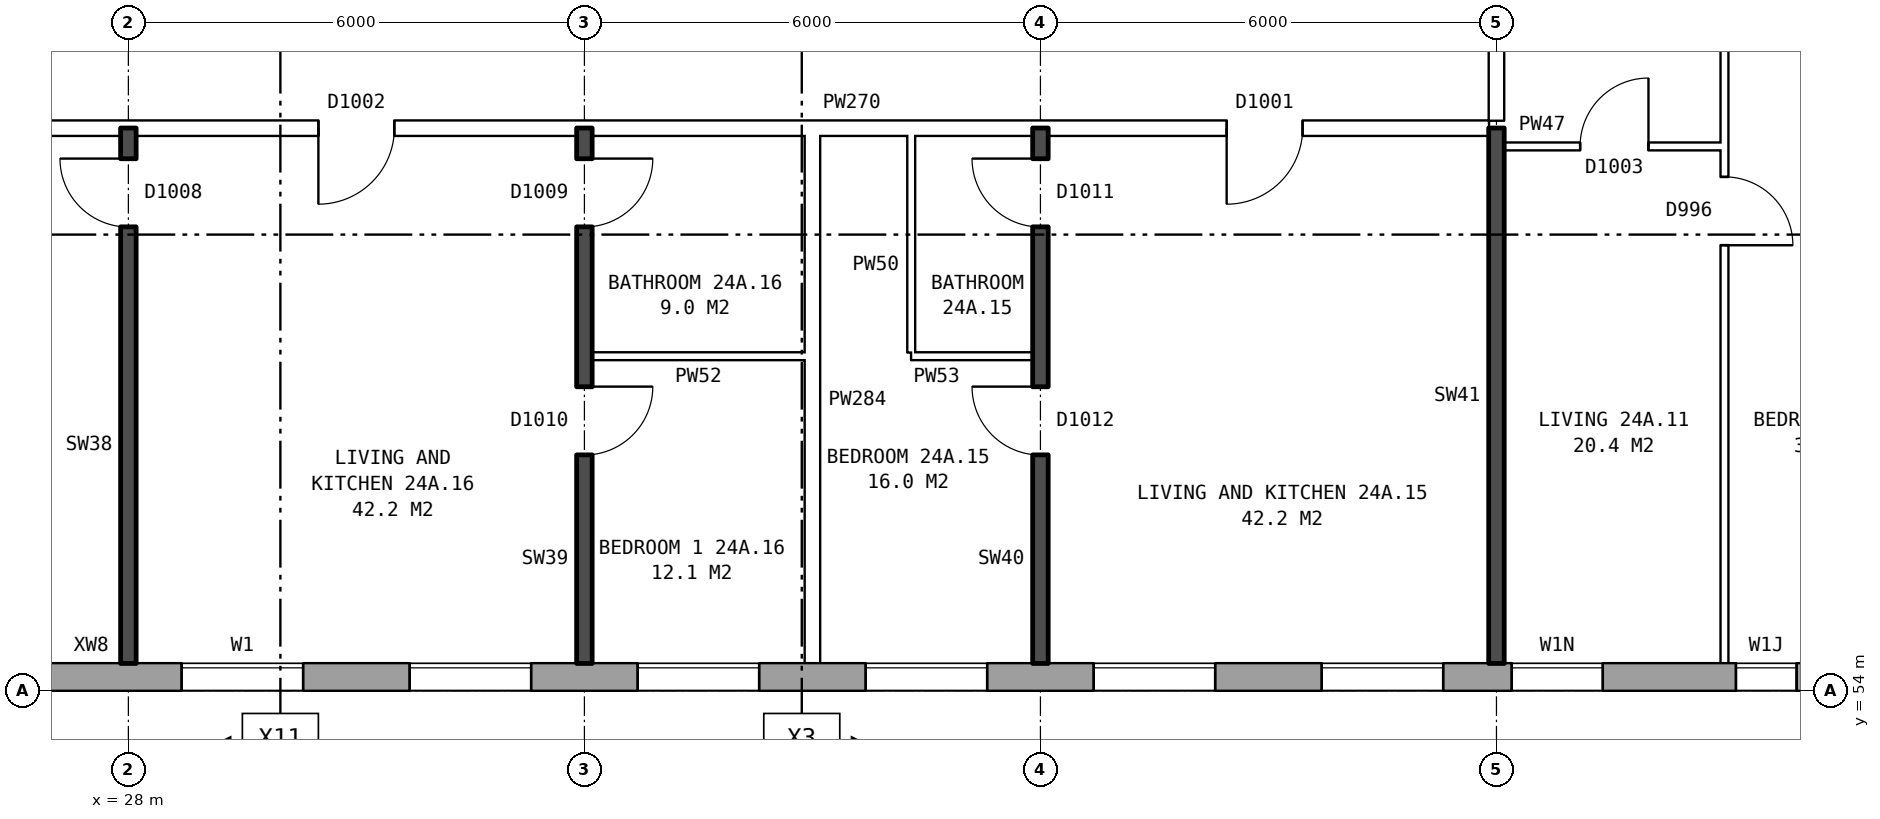
"""IFC4 building model, lengths in metres.
Left out: names, types, materials, properties, quantities, classifications, styles, units other than length and angle.
Written with IfcOpenShell. Run it as: python <this file> out.ifc"""

import sys

from ifc_helpers import new_model, si_unit, direction, frame, frame_2d, origin, place, context, subcontext, project, spatial, rectangle, extrude, element, fill, save


model = new_model("IFC4")
c1 = context("Model", 3, precision=1e-05, world=origin(), true_north=direction((0.0, 1.0)))
c2 = subcontext(c1, "Body", "Model", "MODEL_VIEW")
j1 = project(units=[si_unit("LENGTHUNIT", "METRE"), si_unit("PLANEANGLEUNIT", "RADIAN")], contexts=[c1])
p1 = place(None, origin())
s1 = spatial("IfcSite", under=j1, at=p1, CompositionType="ELEMENT")
p2 = place(p1, origin())
s2 = spatial("IfcBuilding", under=s1, at=p2, CompositionType="ELEMENT")
p3 = place(p2, frame((0.0, 0.0, 87.1)))
s3 = spatial("IfcBuildingStorey", under=s2, at=p3, CompositionType="ELEMENT", Elevation=87.1)
p4 = place(p3, frame((26.325, 54.18, 0.0), z_axis=(0.0, 0.0, 1.0), x_axis=(1.0, 0.0, 0.0)))
e1 = element("IfcWall", 1, at=p4, inside=s3, PredefinedType="STANDARD", context=c2, shape_type="SweptSolid", body=[
    extrude(rectangle(XDim=46.601, YDim=0.36, at=frame_2d((23.3, 0.0))), origin(), (0.0, 0.0, 1.0), 2.85),
])
p5 = place(p4, frame((2.375, 0.0, 0.8)))
e2 = element("IfcOpeningElement", 2, at=p5, cuts=e1, PredefinedType="OPENING", context=c2, shape_type="SweptSolid", body=[
    extrude(rectangle(XDim=1.6, YDim=1.8, at=frame_2d((0.8, 0.9))), frame((0.0, 0.19, 0.0), z_axis=(0.0, -1.0, 0.0), x_axis=(1.0, 0.0, 0.0)), (0.0, 0.0, 1.0), 0.38),
])
p6 = place(p4, frame((5.375, 0.0, 0.8)))
e3 = element("IfcOpeningElement", 3, at=p6, cuts=e1, PredefinedType="OPENING", context=c2, shape_type="SweptSolid", body=[
    extrude(rectangle(XDim=1.6, YDim=1.8, at=frame_2d((0.8, 0.9))), frame((0.0, 0.19, 0.0), z_axis=(0.0, -1.0, 0.0), x_axis=(1.0, 0.0, 0.0)), (0.0, 0.0, 1.0), 0.38),
])
p7 = place(p4, frame((8.375, 0.0, 0.8)))
e4 = element("IfcOpeningElement", 4, at=p7, cuts=e1, PredefinedType="OPENING", context=c2, shape_type="SweptSolid", body=[
    extrude(rectangle(XDim=1.6, YDim=1.8, at=frame_2d((0.8, 0.9))), frame((0.0, 0.19, 0.0), z_axis=(0.0, -1.0, 0.0), x_axis=(1.0, 0.0, 0.0)), (0.0, 0.0, 1.0), 0.38),
])
p8 = place(p4, frame((11.375, 0.0, 0.8)))
e5 = element("IfcOpeningElement", 5, at=p8, cuts=e1, PredefinedType="OPENING", context=c2, shape_type="SweptSolid", body=[
    extrude(rectangle(XDim=1.6, YDim=1.8, at=frame_2d((0.8, 0.9))), frame((0.0, 0.19, 0.0), z_axis=(0.0, -1.0, 0.0), x_axis=(1.0, 0.0, 0.0)), (0.0, 0.0, 1.0), 0.38),
])
p9 = place(p4, frame((14.375, 0.0, 0.8)))
e6 = element("IfcOpeningElement", 6, at=p9, cuts=e1, PredefinedType="OPENING", context=c2, shape_type="SweptSolid", body=[
    extrude(rectangle(XDim=1.6, YDim=1.8, at=frame_2d((0.8, 0.9))), frame((0.0, 0.19, 0.0), z_axis=(0.0, -1.0, 0.0), x_axis=(1.0, 0.0, 0.0)), (0.0, 0.0, 1.0), 0.38),
])
p10 = place(p4, frame((17.375, 0.0, 0.8)))
e7 = element("IfcOpeningElement", 7, at=p10, cuts=e1, PredefinedType="OPENING", context=c2, shape_type="SweptSolid", body=[
    extrude(rectangle(XDim=1.6, YDim=1.8, at=frame_2d((0.8, 0.9))), frame((0.0, 0.19, 0.0), z_axis=(0.0, -1.0, 0.0), x_axis=(1.0, 0.0, 0.0)), (0.0, 0.0, 1.0), 0.38),
])
p11 = place(p4, frame((19.875, 0.0, 1.4)))
e8 = element("IfcOpeningElement", 8, at=p11, cuts=e1, PredefinedType="OPENING", context=c2, shape_type="SweptSolid", body=[
    extrude(rectangle(XDim=1.2, YDim=1.2, at=frame_2d((0.6, 0.6))), frame((0.0, 0.19, 0.0), z_axis=(0.0, -1.0, 0.0), x_axis=(1.0, 0.0, 0.0)), (0.0, 0.0, 1.0), 0.38),
])
p12 = place(p4, frame((22.825, 0.0, 0.25)))
e9 = element("IfcOpeningElement", 9, at=p12, cuts=e1, PredefinedType="OPENING", context=c2, shape_type="SweptSolid", body=[
    extrude(rectangle(XDim=0.8, YDim=1.5, at=frame_2d((0.4, 0.75))), frame((0.0, 0.19, 0.0), z_axis=(0.0, -1.0, 0.0), x_axis=(1.0, 0.0, 0.0)), (0.0, 0.0, 1.0), 0.38),
])
p13 = place(p4, frame((26.375, 0.0, 0.8)))
e10 = element("IfcOpeningElement", 10, at=p13, cuts=e1, PredefinedType="OPENING", context=c2, shape_type="SweptSolid", body=[
    extrude(rectangle(XDim=1.6, YDim=1.8, at=frame_2d((0.8, 0.9))), frame((0.0, 0.19, 0.0), z_axis=(0.0, -1.0, 0.0), x_axis=(1.0, 0.0, 0.0)), (0.0, 0.0, 1.0), 0.38),
])
p14 = place(p4, frame((29.375, 0.0, 0.8)))
e11 = element("IfcOpeningElement", 11, at=p14, cuts=e1, PredefinedType="OPENING", context=c2, shape_type="SweptSolid", body=[
    extrude(rectangle(XDim=1.6, YDim=1.8, at=frame_2d((0.8, 0.9))), frame((0.0, 0.19, 0.0), z_axis=(0.0, -1.0, 0.0), x_axis=(1.0, 0.0, 0.0)), (0.0, 0.0, 1.0), 0.38),
])
p15 = place(p4, frame((32.375, 0.0, 0.8)))
e12 = element("IfcOpeningElement", 12, at=p15, cuts=e1, PredefinedType="OPENING", context=c2, shape_type="SweptSolid", body=[
    extrude(rectangle(XDim=1.6, YDim=1.8, at=frame_2d((0.8, 0.9))), frame((0.0, 0.19, 0.0), z_axis=(0.0, -1.0, 0.0), x_axis=(1.0, 0.0, 0.0)), (0.0, 0.0, 1.0), 0.38),
])
p16 = place(p4, frame((35.375, 0.0, 0.8)))
e13 = element("IfcOpeningElement", 13, at=p16, cuts=e1, PredefinedType="OPENING", context=c2, shape_type="SweptSolid", body=[
    extrude(rectangle(XDim=1.6, YDim=1.8, at=frame_2d((0.8, 0.9))), frame((0.0, 0.19, 0.0), z_axis=(0.0, -1.0, 0.0), x_axis=(1.0, 0.0, 0.0)), (0.0, 0.0, 1.0), 0.38),
])
p17 = place(p4, frame((38.375, 0.0, 0.8)))
e14 = element("IfcOpeningElement", 14, at=p17, cuts=e1, PredefinedType="OPENING", context=c2, shape_type="SweptSolid", body=[
    extrude(rectangle(XDim=1.6, YDim=1.8, at=frame_2d((0.8, 0.9))), frame((0.0, 0.19, 0.0), z_axis=(0.0, -1.0, 0.0), x_axis=(1.0, 0.0, 0.0)), (0.0, 0.0, 1.0), 0.38),
])
p18 = place(p4, frame((41.375, 0.0, 0.8)))
e15 = element("IfcOpeningElement", 15, at=p18, cuts=e1, PredefinedType="OPENING", context=c2, shape_type="SweptSolid", body=[
    extrude(rectangle(XDim=1.6, YDim=1.8, at=frame_2d((0.8, 0.9))), frame((0.0, 0.19, 0.0), z_axis=(0.0, -1.0, 0.0), x_axis=(1.0, 0.0, 0.0)), (0.0, 0.0, 1.0), 0.38),
])
p19 = place(p4, frame((44.375, 0.0, 0.8)))
e16 = element("IfcOpeningElement", 16, at=p19, cuts=e1, PredefinedType="OPENING", context=c2, shape_type="SweptSolid", body=[
    extrude(rectangle(XDim=1.6, YDim=1.8, at=frame_2d((0.8, 0.9))), frame((0.0, 0.19, 0.0), z_axis=(0.0, -1.0, 0.0), x_axis=(1.0, 0.0, 0.0)), (0.0, 0.0, 1.0), 0.38),
])
p20 = place(p4, frame((23.925, 0.0, 0.15)))
e17 = element("IfcOpeningElement", 17, at=p20, cuts=e1, PredefinedType="OPENING", context=c2, shape_type="SweptSolid", body=[
    extrude(rectangle(XDim=0.6, YDim=0.9, at=frame_2d((0.3, 0.45))), frame((0.0, 0.19, 0.0), z_axis=(0.0, -1.0, 0.0), x_axis=(1.0, 0.0, 0.0)), (0.0, 0.0, 1.0), 0.38),
])
p21 = place(p3, frame((34.1, 58.4, 0.0), z_axis=(0.0, 0.0, 1.0), x_axis=(1.0, 0.0, 0.0)))
e18 = element("IfcWall", 18, at=p21, inside=s3, PredefinedType="PARTITIONING", context=c2, shape_type="SweptSolid", body=[
    extrude(rectangle(XDim=2.8, YDim=0.1, at=frame_2d((1.4, 0.0))), origin(), (0.0, 0.0, 1.0), 2.85),
])
p22 = place(p3, frame((38.3, 58.4, 0.0), z_axis=(0.0, 0.0, 1.0), x_axis=(1.0, 0.0, 0.0)))
e19 = element("IfcWall", 19, at=p22, inside=s3, PredefinedType="PARTITIONING", context=c2, shape_type="SweptSolid", body=[
    extrude(rectangle(XDim=1.6, YDim=0.1, at=frame_2d((0.8, 0.0))), origin(), (0.0, 0.0, 1.0), 2.85),
])
p23 = place(p3, frame((46.1, 61.16, 0.0), z_axis=(0.0, 0.0, 1.0), x_axis=(1.0, 0.0, 0.0)))
e20 = element("IfcWall", 20, at=p23, inside=s3, PredefinedType="PARTITIONING", context=c2, shape_type="SweptSolid", body=[
    extrude(rectangle(XDim=2.9, YDim=0.1, at=frame_2d((1.45, 0.0))), origin(), (0.0, 0.0, 1.0), 2.85),
])
p24 = place(p23, frame((1.0, 0.0, 0.0)))
e21 = element("IfcOpeningElement", 21, at=p24, cuts=e20, PredefinedType="OPENING", context=c2, shape_type="SweptSolid", body=[
    extrude(rectangle(XDim=0.9, YDim=2.1, at=frame_2d((0.45, 1.05))), frame((0.0, 0.06, 0.0), z_axis=(0.0, -1.0, 0.0), x_axis=(1.0, 0.0, 0.0)), (0.0, 0.0, 1.0), 0.12),
])
p25 = place(p3, frame((23.61, 61.4, 0.0), z_axis=(0.0, 0.0, 1.0), x_axis=(1.0, 0.0, 0.0)))
e22 = element("IfcWall", 22, at=p25, inside=s3, PredefinedType="PARTITIONING", context=c2, shape_type="SweptSolid", body=[
    extrude(rectangle(XDim=22.29, YDim=0.2, at=frame_2d((11.145, 0.0))), origin(), (0.0, 0.0, 1.0), 2.85),
])
p26 = place(p25, frame((18.84, 0.0, 0.0)))
e23 = element("IfcOpeningElement", 23, at=p26, cuts=e22, PredefinedType="OPENING", context=c2, shape_type="SweptSolid", body=[
    extrude(rectangle(XDim=1.0, YDim=2.1, at=frame_2d((0.5, 1.05))), frame((0.0, 0.11, 0.0), z_axis=(0.0, -1.0, 0.0), x_axis=(1.0, 0.0, 0.0)), (0.0, 0.0, 1.0), 0.22),
])
p27 = place(p25, frame((6.89, 0.0, 0.0)))
e24 = element("IfcOpeningElement", 24, at=p27, cuts=e22, PredefinedType="OPENING", context=c2, shape_type="SweptSolid", body=[
    extrude(rectangle(XDim=1.0, YDim=2.1, at=frame_2d((0.5, 1.05))), frame((0.0, 0.11, 0.0), z_axis=(0.0, -1.0, 0.0), x_axis=(1.0, 0.0, 0.0)), (0.0, 0.0, 1.0), 0.22),
])
p28 = place(p3, frame((28.0, 54.36, 0.0), z_axis=(0.0, 0.0, 1.0), x_axis=(0.0, 1.0, 0.0)))
e25 = element("IfcWall", 25, at=p28, inside=s3, PredefinedType="SOLIDWALL", context=c2, shape_type="SweptSolid", body=[
    extrude(rectangle(XDim=7.04, YDim=0.2, at=frame_2d((3.52, 0.0))), origin(), (0.0, 0.0, 1.0), 2.85),
])
p29 = place(p28, frame((5.74, 0.0, 0.0)))
e26 = element("IfcOpeningElement", 26, at=p29, cuts=e25, PredefinedType="OPENING", context=c2, shape_type="SweptSolid", body=[
    extrude(rectangle(XDim=0.9, YDim=2.1, at=frame_2d((0.45, 1.05))), frame((0.0, 0.11, 0.0), z_axis=(0.0, -1.0, 0.0), x_axis=(1.0, 0.0, 0.0)), (0.0, 0.0, 1.0), 0.22),
])
p30 = place(p3, frame((34.0, 54.36, 0.0), z_axis=(0.0, 0.0, 1.0), x_axis=(0.0, 1.0, 0.0)))
e27 = element("IfcWall", 27, at=p30, inside=s3, PredefinedType="SOLIDWALL", context=c2, shape_type="SweptSolid", body=[
    extrude(rectangle(XDim=7.04, YDim=0.2, at=frame_2d((3.52, 0.0))), origin(), (0.0, 0.0, 1.0), 2.85),
])
p31 = place(p30, frame((2.74, 0.0, 0.0)))
e28 = element("IfcOpeningElement", 28, at=p31, cuts=e27, PredefinedType="OPENING", context=c2, shape_type="SweptSolid", body=[
    extrude(rectangle(XDim=0.9, YDim=2.1, at=frame_2d((0.45, 1.05))), frame((0.0, 0.11, 0.0), z_axis=(0.0, -1.0, 0.0), x_axis=(1.0, 0.0, 0.0)), (0.0, 0.0, 1.0), 0.22),
])
p32 = place(p30, frame((5.74, 0.0, 0.0)))
e29 = element("IfcOpeningElement", 29, at=p32, cuts=e27, PredefinedType="OPENING", context=c2, shape_type="SweptSolid", body=[
    extrude(rectangle(XDim=0.9, YDim=2.1, at=frame_2d((0.45, 1.05))), frame((0.0, 0.11, 0.0), z_axis=(0.0, -1.0, 0.0), x_axis=(1.0, 0.0, 0.0)), (0.0, 0.0, 1.0), 0.22),
])
p33 = place(p3, frame((37.0, 54.36, 0.0), z_axis=(0.0, 0.0, 1.0), x_axis=(0.0, 1.0, 0.0)))
e30 = element("IfcWall", 30, at=p33, inside=s3, PredefinedType="PARTITIONING", context=c2, shape_type="SweptSolid", body=[
    extrude(rectangle(XDim=6.94, YDim=0.2, at=frame_2d((3.47, 0.0))), origin(), (0.0, 0.0, 1.0), 2.85),
])
p34 = place(p3, frame((38.3, 58.45, 0.0), z_axis=(0.0, 0.0, 1.0), x_axis=(0.0, 1.0, 0.0)))
e31 = element("IfcWall", 31, at=p34, inside=s3, PredefinedType="PARTITIONING", context=c2, shape_type="SweptSolid", body=[
    extrude(rectangle(XDim=2.85, YDim=0.1, at=frame_2d((1.425, 0.0))), origin(), (0.0, 0.0, 1.0), 2.85),
])
p35 = place(p3, frame((40.0, 54.36, 0.0), z_axis=(0.0, 0.0, 1.0), x_axis=(0.0, 1.0, 0.0)))
e32 = element("IfcWall", 32, at=p35, inside=s3, PredefinedType="SOLIDWALL", context=c2, shape_type="SweptSolid", body=[
    extrude(rectangle(XDim=7.04, YDim=0.2, at=frame_2d((3.52, 0.0))), origin(), (0.0, 0.0, 1.0), 2.85),
])
p36 = place(p35, frame((2.74, 0.0, 0.0)))
e33 = element("IfcOpeningElement", 33, at=p36, cuts=e32, PredefinedType="OPENING", context=c2, shape_type="SweptSolid", body=[
    extrude(rectangle(XDim=0.9, YDim=2.1, at=frame_2d((0.45, 1.05))), frame((0.0, 0.11, 0.0), z_axis=(0.0, -1.0, 0.0), x_axis=(1.0, 0.0, 0.0)), (0.0, 0.0, 1.0), 0.22),
])
p37 = place(p35, frame((5.74, 0.0, 0.0)))
e34 = element("IfcOpeningElement", 34, at=p37, cuts=e32, PredefinedType="OPENING", context=c2, shape_type="SweptSolid", body=[
    extrude(rectangle(XDim=0.9, YDim=2.1, at=frame_2d((0.45, 1.05))), frame((0.0, 0.11, 0.0), z_axis=(0.0, -1.0, 0.0), x_axis=(1.0, 0.0, 0.0)), (0.0, 0.0, 1.0), 0.22),
])
p38 = place(p3, frame((46.0, 54.36, 0.0), z_axis=(0.0, 0.0, 1.0), x_axis=(0.0, 1.0, 0.0)))
e35 = element("IfcWall", 35, at=p38, inside=s3, PredefinedType="SOLIDWALL", context=c2, shape_type="SweptSolid", body=[
    extrude(rectangle(XDim=7.04, YDim=0.2, at=frame_2d((3.52, 0.0))), origin(), (0.0, 0.0, 1.0), 2.85),
])
p39 = place(p3, frame((46.0, 61.5, 0.0), z_axis=(0.0, 0.0, 1.0), x_axis=(0.0, 1.0, 0.0)))
e36 = element("IfcWall", 36, at=p39, inside=s3, PredefinedType="PARTITIONING", context=c2, shape_type="SweptSolid", body=[
    extrude(rectangle(XDim=2.2, YDim=0.2, at=frame_2d((1.1, 0.0))), origin(), (0.0, 0.0, 1.0), 2.85),
])
p40 = place(p3, frame((49.0, 54.36, 0.0), z_axis=(0.0, 0.0, 1.0), x_axis=(0.0, 1.0, 0.0)))
e37 = element("IfcWall", 37, at=p40, inside=s3, PredefinedType="PARTITIONING", context=c2, shape_type="SweptSolid", body=[
    extrude(rectangle(XDim=14.34, YDim=0.1, at=frame_2d((7.17, 0.0))), origin(), (0.0, 0.0, 1.0), 2.85),
])
p41 = place(p40, frame((5.5, 0.0, 0.0)))
e38 = element("IfcOpeningElement", 38, at=p41, cuts=e37, PredefinedType="OPENING", context=c2, shape_type="SweptSolid", body=[
    extrude(rectangle(XDim=0.9, YDim=2.1, at=frame_2d((0.45, 1.05))), frame((0.0, 0.06, 0.0), z_axis=(0.0, -1.0, 0.0), x_axis=(1.0, 0.0, 0.0)), (0.0, 0.0, 1.0), 0.12),
])
p42 = place(p40, frame((13.04, 0.0, 0.0)))
e39 = element("IfcOpeningElement", 39, at=p42, cuts=e37, PredefinedType="OPENING", context=c2, shape_type="SweptSolid", body=[
    extrude(rectangle(XDim=0.9, YDim=2.1, at=frame_2d((0.45, 1.05))), frame((0.0, 0.06, 0.0), z_axis=(0.0, -1.0, 0.0), x_axis=(1.0, 0.0, 0.0)), (0.0, 0.0, 1.0), 0.12),
])
p43 = place(p5, origin())
e40 = element("IfcWindow", 40, at=p43, inside=s3, PartitioningType="SINGLE_PANEL", PredefinedType="WINDOW", context=c2, shape_type="SweptSolid", body=[
    extrude(rectangle(XDim=1.6, YDim=1.8, at=frame_2d((0.8, 0.9))), frame((0.0, 0.15, 0.0), z_axis=(0.0, -1.0, 0.0), x_axis=(1.0, 0.0, 0.0)), (0.0, 0.0, 1.0), 0.06),
])
fill(e2, e40)
p44 = place(p6, origin())
e41 = element("IfcWindow", 41, at=p44, inside=s3, PartitioningType="SINGLE_PANEL", PredefinedType="WINDOW", context=c2, shape_type="SweptSolid", body=[
    extrude(rectangle(XDim=1.6, YDim=1.8, at=frame_2d((0.8, 0.9))), frame((0.0, 0.15, 0.0), z_axis=(0.0, -1.0, 0.0), x_axis=(1.0, 0.0, 0.0)), (0.0, 0.0, 1.0), 0.06),
])
fill(e3, e41)
p45 = place(p7, origin())
e42 = element("IfcWindow", 42, at=p45, inside=s3, PartitioningType="SINGLE_PANEL", PredefinedType="WINDOW", context=c2, shape_type="SweptSolid", body=[
    extrude(rectangle(XDim=1.6, YDim=1.8, at=frame_2d((0.8, 0.9))), frame((0.0, 0.15, 0.0), z_axis=(0.0, -1.0, 0.0), x_axis=(1.0, 0.0, 0.0)), (0.0, 0.0, 1.0), 0.06),
])
fill(e4, e42)
p46 = place(p8, origin())
e43 = element("IfcWindow", 43, at=p46, inside=s3, PartitioningType="SINGLE_PANEL", PredefinedType="WINDOW", context=c2, shape_type="SweptSolid", body=[
    extrude(rectangle(XDim=1.6, YDim=1.8, at=frame_2d((0.8, 0.9))), frame((0.0, 0.15, 0.0), z_axis=(0.0, -1.0, 0.0), x_axis=(1.0, 0.0, 0.0)), (0.0, 0.0, 1.0), 0.06),
])
fill(e5, e43)
p47 = place(p9, origin())
e44 = element("IfcWindow", 44, at=p47, inside=s3, PartitioningType="SINGLE_PANEL", PredefinedType="WINDOW", context=c2, shape_type="SweptSolid", body=[
    extrude(rectangle(XDim=1.6, YDim=1.8, at=frame_2d((0.8, 0.9))), frame((0.0, 0.15, 0.0), z_axis=(0.0, -1.0, 0.0), x_axis=(1.0, 0.0, 0.0)), (0.0, 0.0, 1.0), 0.06),
])
fill(e6, e44)
p48 = place(p10, origin())
e45 = element("IfcWindow", 45, at=p48, inside=s3, PartitioningType="SINGLE_PANEL", PredefinedType="WINDOW", context=c2, shape_type="SweptSolid", body=[
    extrude(rectangle(XDim=1.6, YDim=1.8, at=frame_2d((0.8, 0.9))), frame((0.0, 0.15, 0.0), z_axis=(0.0, -1.0, 0.0), x_axis=(1.0, 0.0, 0.0)), (0.0, 0.0, 1.0), 0.06),
])
fill(e7, e45)
p49 = place(p11, origin())
e46 = element("IfcWindow", 46, at=p49, inside=s3, PartitioningType="SINGLE_PANEL", PredefinedType="WINDOW", context=c2, shape_type="SweptSolid", body=[
    extrude(rectangle(XDim=1.2, YDim=1.2, at=frame_2d((0.6, 0.6))), frame((0.0, 0.15, 0.0), z_axis=(0.0, -1.0, 0.0), x_axis=(1.0, 0.0, 0.0)), (0.0, 0.0, 1.0), 0.06),
])
fill(e8, e46)
p50 = place(p12, origin())
e47 = element("IfcWindow", 47, at=p50, inside=s3, PartitioningType="SINGLE_PANEL", PredefinedType="WINDOW", context=c2, shape_type="SweptSolid", body=[
    extrude(rectangle(XDim=0.8, YDim=1.5, at=frame_2d((0.4, 0.75))), frame((0.0, 0.15, 0.0), z_axis=(0.0, -1.0, 0.0), x_axis=(1.0, 0.0, 0.0)), (0.0, 0.0, 1.0), 0.06),
])
fill(e9, e47)
p51 = place(p41, frame((0.9, 0.0, 0.0), z_axis=(0.0, 0.0, 1.0), x_axis=(-1.0, 0.0, 0.0)))
e48 = element("IfcDoor", 48, at=p51, inside=s3, OperationType="SINGLE_SWING_RIGHT", PredefinedType="DOOR", context=c2, shape_type="SweptSolid", body=[
    extrude(rectangle(XDim=0.9, YDim=2.1, at=frame_2d((0.45, 1.05))), frame((0.0, 0.025, 0.0), z_axis=(0.0, -1.0, 0.0), x_axis=(1.0, 0.0, 0.0)), (0.0, 0.0, 1.0), 0.05),
])
fill(e38, e48)
p52 = place(p24, origin())
e49 = element("IfcDoor", 49, at=p52, inside=s3, OperationType="SINGLE_SWING_RIGHT", PredefinedType="DOOR", context=c2, shape_type="SweptSolid", body=[
    extrude(rectangle(XDim=0.9, YDim=2.1, at=frame_2d((0.45, 1.05))), frame((0.0, 0.025, 0.0), z_axis=(0.0, -1.0, 0.0), x_axis=(1.0, 0.0, 0.0)), (0.0, 0.0, 1.0), 0.05),
])
fill(e21, e49)
p53 = place(p36, origin())
e50 = element("IfcDoor", 50, at=p53, inside=s3, OperationType="SINGLE_SWING_RIGHT", PredefinedType="DOOR", context=c2, shape_type="SweptSolid", body=[
    extrude(rectangle(XDim=0.9, YDim=2.1, at=frame_2d((0.45, 1.05))), frame((0.0, 0.025, 0.0), z_axis=(0.0, -1.0, 0.0), x_axis=(1.0, 0.0, 0.0)), (0.0, 0.0, 1.0), 0.05),
])
fill(e33, e50)
p54 = place(p26, frame((1.0, 0.0, 0.0), z_axis=(0.0, 0.0, 1.0), x_axis=(-1.0, 0.0, 0.0)))
e51 = element("IfcDoor", 51, at=p54, inside=s3, OperationType="SINGLE_SWING_RIGHT", PredefinedType="DOOR", context=c2, shape_type="SweptSolid", body=[
    extrude(rectangle(XDim=1.0, YDim=2.1, at=frame_2d((0.5, 1.05))), frame((0.0, 0.025, 0.0), z_axis=(0.0, -1.0, 0.0), x_axis=(1.0, 0.0, 0.0)), (0.0, 0.0, 1.0), 0.05),
])
fill(e23, e51)
p55 = place(p37, origin())
e52 = element("IfcDoor", 52, at=p55, inside=s3, OperationType="SINGLE_SWING_RIGHT", PredefinedType="DOOR", context=c2, shape_type="SweptSolid", body=[
    extrude(rectangle(XDim=0.9, YDim=2.1, at=frame_2d((0.45, 1.05))), frame((0.0, 0.025, 0.0), z_axis=(0.0, -1.0, 0.0), x_axis=(1.0, 0.0, 0.0)), (0.0, 0.0, 1.0), 0.05),
])
fill(e34, e52)
p56 = place(p31, frame((0.9, 0.0, 0.0), z_axis=(0.0, 0.0, 1.0), x_axis=(-1.0, 0.0, 0.0)))
e53 = element("IfcDoor", 53, at=p56, inside=s3, OperationType="SINGLE_SWING_LEFT", PredefinedType="DOOR", context=c2, shape_type="SweptSolid", body=[
    extrude(rectangle(XDim=0.9, YDim=2.1, at=frame_2d((0.45, 1.05))), frame((0.0, 0.025, 0.0), z_axis=(0.0, -1.0, 0.0), x_axis=(1.0, 0.0, 0.0)), (0.0, 0.0, 1.0), 0.05),
])
fill(e28, e53)
p57 = place(p29, origin())
e54 = element("IfcDoor", 54, at=p57, inside=s3, OperationType="SINGLE_SWING_RIGHT", PredefinedType="DOOR", context=c2, shape_type="SweptSolid", body=[
    extrude(rectangle(XDim=0.9, YDim=2.1, at=frame_2d((0.45, 1.05))), frame((0.0, 0.025, 0.0), z_axis=(0.0, -1.0, 0.0), x_axis=(1.0, 0.0, 0.0)), (0.0, 0.0, 1.0), 0.05),
])
fill(e26, e54)
p58 = place(p27, frame((1.0, 0.0, 0.0), z_axis=(0.0, 0.0, 1.0), x_axis=(-1.0, 0.0, 0.0)))
e55 = element("IfcDoor", 55, at=p58, inside=s3, OperationType="SINGLE_SWING_RIGHT", PredefinedType="DOOR", context=c2, shape_type="SweptSolid", body=[
    extrude(rectangle(XDim=1.0, YDim=2.1, at=frame_2d((0.5, 1.05))), frame((0.0, 0.025, 0.0), z_axis=(0.0, -1.0, 0.0), x_axis=(1.0, 0.0, 0.0)), (0.0, 0.0, 1.0), 0.05),
])
fill(e24, e55)
p59 = place(p32, frame((0.9, 0.0, 0.0), z_axis=(0.0, 0.0, 1.0), x_axis=(-1.0, 0.0, 0.0)))
e56 = element("IfcDoor", 56, at=p59, inside=s3, OperationType="SINGLE_SWING_LEFT", PredefinedType="DOOR", context=c2, shape_type="SweptSolid", body=[
    extrude(rectangle(XDim=0.9, YDim=2.1, at=frame_2d((0.45, 1.05))), frame((0.0, 0.025, 0.0), z_axis=(0.0, -1.0, 0.0), x_axis=(1.0, 0.0, 0.0)), (0.0, 0.0, 1.0), 0.05),
])
fill(e29, e56)
save(model, sys.argv[1])
